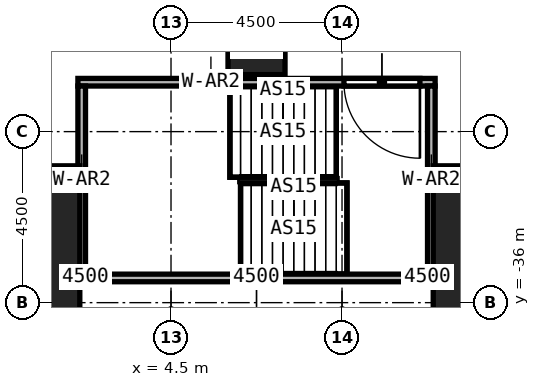
"""IFC4 building model, lengths in metres.
Left out: names, types, materials, properties, quantities, classifications, styles, units other than length and angle.
Written with IfcOpenShell. Run it as: python <this file> out.ifc"""

import sys

from ifc_helpers import new_model, si_unit, direction, frame, frame_2d, origin, origin_2d, place, context, subcontext, project, spatial, rectangle, extrude, element, fill, save


model = new_model("IFC4")
c1 = context("Model", 3, precision=1e-05, world=origin(), true_north=direction((0.0, 1.0)))
c2 = subcontext(c1, "Body", "Model", "MODEL_VIEW")
j1 = project(units=[si_unit("LENGTHUNIT", "METRE"), si_unit("PLANEANGLEUNIT", "RADIAN")], contexts=[c1])
p1 = place(None, origin())
s1 = spatial("IfcSite", under=j1, at=p1, CompositionType="ELEMENT")
p2 = place(p1, origin())
s2 = spatial("IfcBuilding", under=s1, at=p2, CompositionType="ELEMENT")
p3 = place(p2, frame((0.0, 0.0, 12.0)))
s3 = spatial("IfcBuildingStorey", under=s2, at=p3, CompositionType="ELEMENT", Elevation=12.0)
for number, where, z_axis, x_axis in (
    (1, (0.0, -35.7, 0.0), (0.0, 0.0, 1.0), (1.0, 0.0, 0.0)),
    (2, (13.5, -35.7, 0.0), (0.0, 0.0, 1.0), (1.0, 0.0, 0.0)),
):
    element("IfcColumn", number, at=place(p3, frame(where, z_axis=z_axis, x_axis=x_axis)), inside=s3, PredefinedType="COLUMN", context=c2, shape_type="SweptSolid", body=[
        extrude(rectangle(XDim=4.2, YDim=6.6, at=origin_2d()), origin(), (0.0, 0.0, 1.0), 7.0),
    ])
p4 = place(p3, frame((6.75, -29.25, 0.0), z_axis=(0.0, 0.0, 1.0), x_axis=(1.0, 0.0, 0.0)))
e3 = element("IfcColumn", 3, at=p4, inside=s3, PredefinedType="COLUMN", context=c2, shape_type="SweptSolid", body=[
    extrude(rectangle(XDim=1.5, YDim=1.5, at=origin_2d()), origin(), (0.0, 0.0, 1.0), 7.0),
])
p5 = place(p3, frame((11.45, -30.2, 0.0), z_axis=(0.0, 0.0, 1.0), x_axis=(-1.0, 0.0, 0.0)))
e4 = element("IfcWall", 4, at=p5, inside=s3, PredefinedType="SOLIDWALL", context=c2, shape_type="SweptSolid", body=[
    extrude(rectangle(XDim=9.4, YDim=0.2, at=frame_2d((4.7, 0.0))), origin(), (0.0, 0.0, 1.0), 7.0),
])
p6 = place(p5, frame((0.4, 0.0, 0.0)))
e5 = element("IfcOpeningElement", 5, at=p6, cuts=e4, PredefinedType="OPENING", context=c2, shape_type="SweptSolid", body=[
    extrude(rectangle(XDim=2.0, YDim=2.4, at=frame_2d((1.0, 1.2))), frame((0.0, 0.1, 0.0), z_axis=(0.0, -1.0, 0.0), x_axis=(1.0, 0.0, 0.0)), (0.0, 0.0, 1.0), 0.2),
])
p7 = place(p3, frame((2.05, -35.35, 0.0), z_axis=(0.0, 0.0, 1.0), x_axis=(1.0, 0.0, 0.0)))
e6 = element("IfcWall", 6, at=p7, inside=s3, PredefinedType="SOLIDWALL", context=c2, shape_type="SweptSolid", body=[
    extrude(rectangle(XDim=9.4, YDim=0.2, at=frame_2d((4.7, 0.0))), origin(), (0.0, 0.0, 1.0), 7.0),
])
for number, where, z_axis, x_axis in (
    (7, (2.15, -35.25, 0.0), (0.0, 0.0, 1.0), (0.0, 1.0, 0.0)),
    (8, (11.35, -35.25, 0.0), (0.0, 0.0, 1.0), (0.0, 1.0, 0.0)),
):
    element("IfcWall", number, at=place(p3, frame(where, z_axis=z_axis, x_axis=x_axis)), inside=s3, PredefinedType="SOLIDWALL", context=c2, shape_type="SweptSolid", body=[
        extrude(rectangle(XDim=4.95, YDim=0.2, at=frame_2d((2.475, 0.0))), origin(), (0.0, 0.0, 1.0), 7.0),
    ])
p8 = place(p6, origin())
e9 = element("IfcDoor", 9, at=p8, inside=s3, OperationType="DOUBLE_DOOR_SINGLE_SWING", PredefinedType="DOOR", context=c2, shape_type="SweptSolid", body=[
    extrude(rectangle(XDim=2.0, YDim=2.4, at=frame_2d((1.0, 1.2))), frame((0.0, 0.025, 0.0), z_axis=(0.0, -1.0, 0.0), x_axis=(1.0, 0.0, 0.0)), (0.0, 0.0, 1.0), 0.05),
])
fill(e5, e9)
save(model, sys.argv[1])
